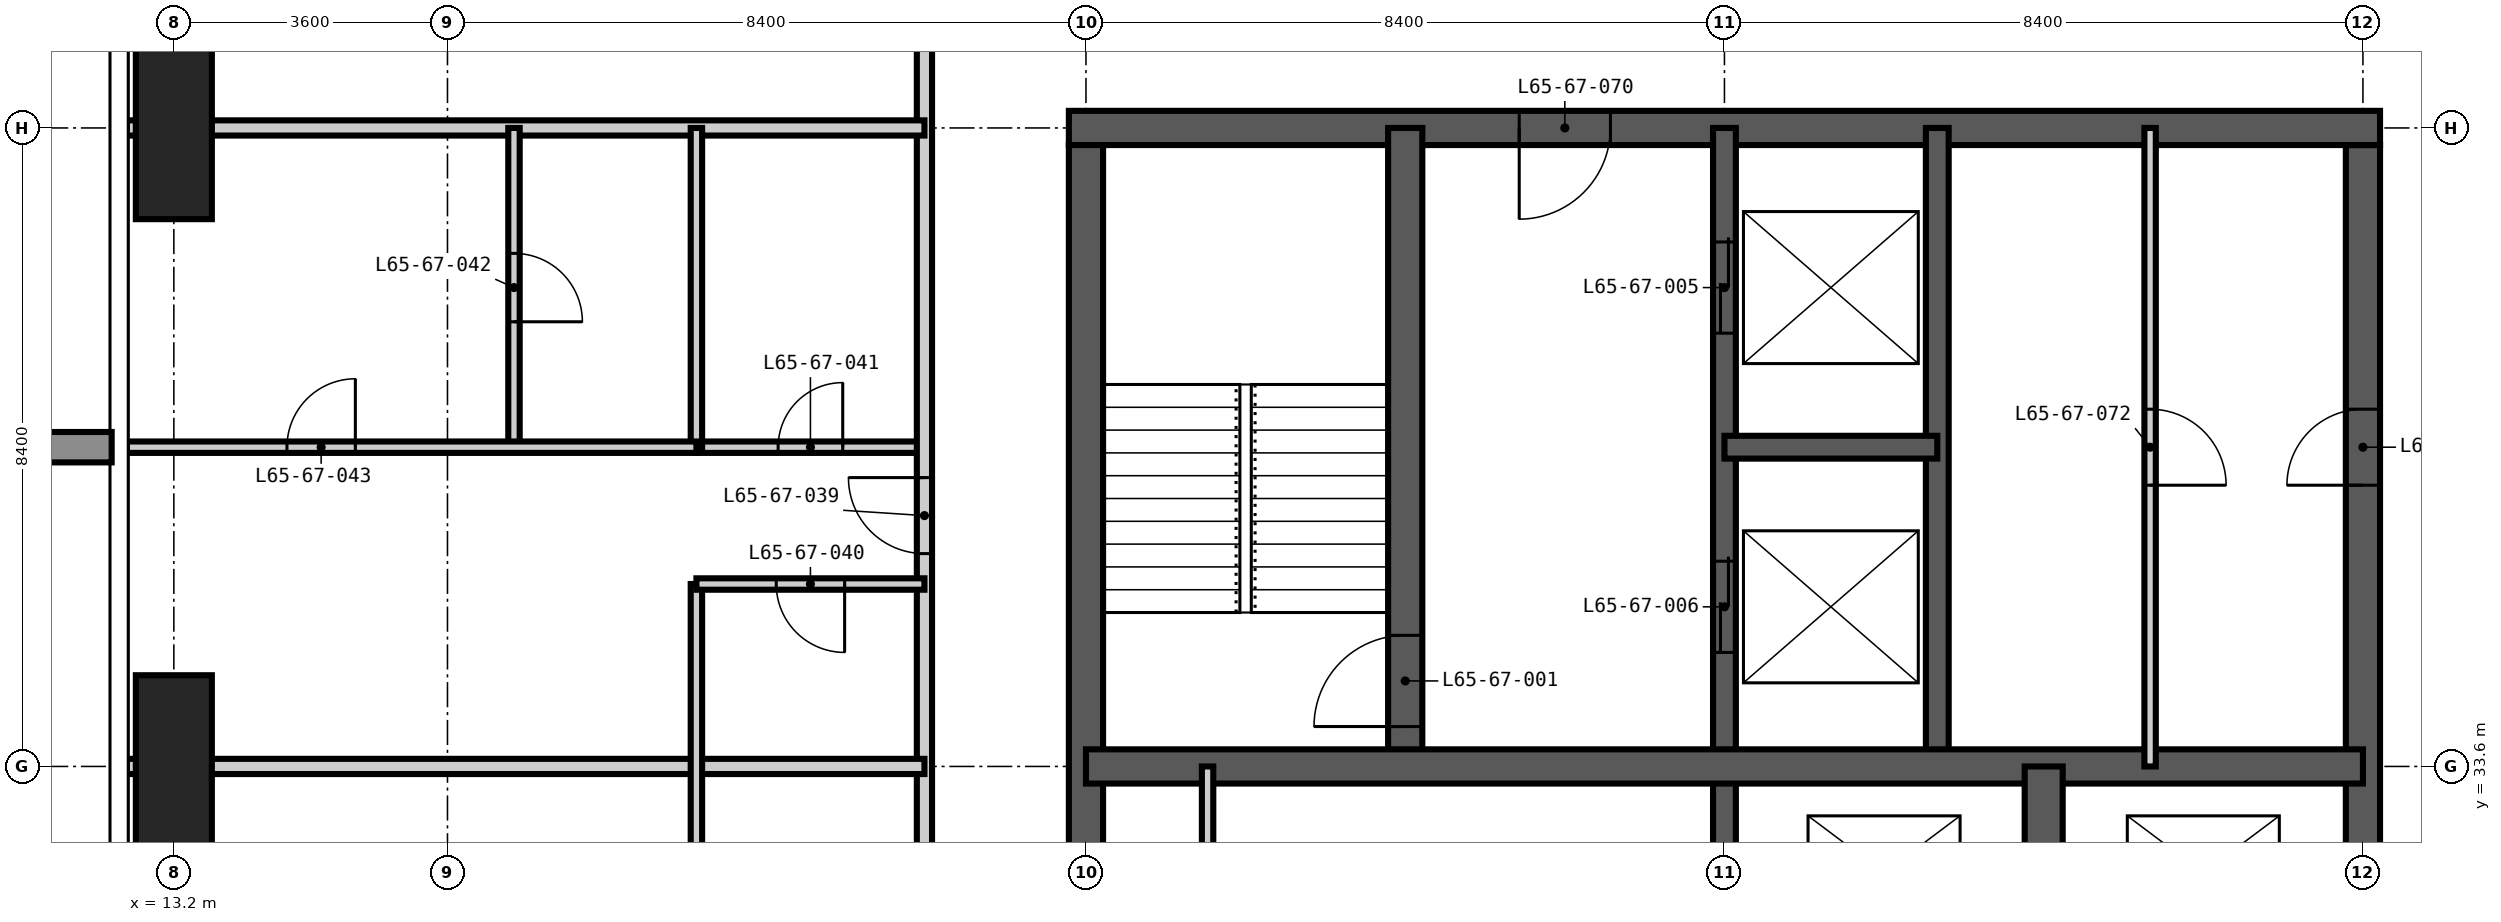
"""IFC4 building model, lengths in metres.
Left out: names, types, materials, properties, quantities, classifications, styles, units other than length and angle.
Written with IfcOpenShell. Run it as: python <this file> out.ifc"""

import sys

from ifc_helpers import new_model, si_unit, direction, frame, frame_2d, origin, origin_2d, place, context, subcontext, project, spatial, rectangle, extrude, element, fill, save


model = new_model("IFC4")
c1 = context("Model", 3, precision=1e-05, world=origin(), true_north=direction((0.0, 1.0)))
c2 = subcontext(c1, "Body", "Model", "MODEL_VIEW")
j1 = project(units=[si_unit("LENGTHUNIT", "METRE"), si_unit("PLANEANGLEUNIT", "RADIAN")], contexts=[c1])
p1 = place(None, origin())
s1 = spatial("IfcSite", under=j1, at=p1, CompositionType="ELEMENT")
p2 = place(p1, origin())
s2 = spatial("IfcBuilding", under=s1, at=p2, CompositionType="ELEMENT")
p3 = place(p2, frame((0.0, 0.0, 252.9)))
s3 = spatial("IfcBuildingStorey", under=s2, at=p3, CompositionType="ELEMENT", Elevation=252.9)
for number, where, z_axis, x_axis in (
    (1, (13.2, 33.6, -0.35), (0.0, 0.0, 1.0), (1.0, 0.0, 0.0)),
    (2, (13.2, 42.0, -0.35), (0.0, 0.0, 1.0), (1.0, 0.0, 0.0)),
):
    element("IfcColumn", number, at=place(p3, frame(where, z_axis=z_axis, x_axis=x_axis)), inside=s3, PredefinedType="COLUMN", context=c2, shape_type="SweptSolid", body=[
        extrude(rectangle(XDim=1.0, YDim=2.4, at=origin_2d()), origin(), (0.0, 0.0, 1.0), 3.9),
    ])
p4 = place(p3, frame((42.0, 17.025, -0.35), z_axis=(0.0, 0.0, 1.0), x_axis=(0.0, 1.0, 0.0)))
e3 = element("IfcWall", 3, at=p4, inside=s3, PredefinedType="SHEAR", context=c2, shape_type="SweptSolid", body=[
    extrude(rectangle(XDim=24.75, YDim=0.45, at=frame_2d((12.375, 0.0))), origin(), (0.0, 0.0, 1.0), 3.9),
])
p5 = place(p4, frame((0.575, 0.0, 0.35)))
e4 = element("IfcOpeningElement", 4, at=p5, cuts=e3, PredefinedType="OPENING", context=c2, shape_type="SweptSolid", body=[
    extrude(rectangle(XDim=1.2, YDim=2.2, at=frame_2d((0.6, 1.1))), frame((0.0, 0.235, 0.0), z_axis=(0.0, -1.0, 0.0), x_axis=(1.0, 0.0, 0.0)), (0.0, 0.0, 1.0), 0.47),
])
p6 = place(p4, frame((11.475, 0.0, 0.35)))
e5 = element("IfcOpeningElement", 5, at=p6, cuts=e3, PredefinedType="OPENING", context=c2, shape_type="SweptSolid", body=[
    extrude(rectangle(XDim=1.8, YDim=2.2, at=frame_2d((0.9, 1.1))), frame((0.0, 0.235, 0.0), z_axis=(0.0, -1.0, 0.0), x_axis=(1.0, 0.0, 0.0)), (0.0, 0.0, 1.0), 0.47),
])
p7 = place(p4, frame((20.275, 0.0, 0.35)))
e6 = element("IfcOpeningElement", 6, at=p7, cuts=e3, PredefinedType="OPENING", context=c2, shape_type="SweptSolid", body=[
    extrude(rectangle(XDim=1.0, YDim=2.1, at=frame_2d((0.5, 1.05))), frame((0.0, 0.235, 0.0), z_axis=(0.0, -1.0, 0.0), x_axis=(1.0, 0.0, 0.0)), (0.0, 0.0, 1.0), 0.47),
])
p8 = place(p3, frame((42.225, 42.0, -0.35), z_axis=(0.0, 0.0, 1.0), x_axis=(-1.0, 0.0, 0.0)))
e7 = element("IfcWall", 7, at=p8, inside=s3, PredefinedType="SHEAR", context=c2, shape_type="SweptSolid", body=[
    extrude(rectangle(XDim=17.25, YDim=0.45, at=frame_2d((8.625, 0.0))), origin(), (0.0, 0.0, 1.0), 3.9),
])
p9 = place(p8, frame((10.125, 0.0, 0.35)))
e8 = element("IfcOpeningElement", 8, at=p9, cuts=e7, PredefinedType="OPENING", context=c2, shape_type="SweptSolid", body=[
    extrude(rectangle(XDim=1.2, YDim=2.2, at=frame_2d((0.6, 1.1))), frame((0.0, 0.235, 0.0), z_axis=(0.0, -1.0, 0.0), x_axis=(1.0, 0.0, 0.0)), (0.0, 0.0, 1.0), 0.47),
])
p10 = place(p3, frame((25.2, 41.775, -0.35), z_axis=(0.0, 0.0, 1.0), x_axis=(0.0, -1.0, 0.0)))
e9 = element("IfcWall", 9, at=p10, inside=s3, PredefinedType="SHEAR", context=c2, shape_type="SweptSolid", body=[
    extrude(rectangle(XDim=24.75, YDim=0.45, at=frame_2d((12.375, 0.0))), origin(), (0.0, 0.0, 1.0), 3.9),
])
p11 = place(p10, frame((11.875, 0.0, 0.35)))
e10 = element("IfcOpeningElement", 10, at=p11, cuts=e9, PredefinedType="OPENING", context=c2, shape_type="SweptSolid", body=[
    extrude(rectangle(XDim=1.0, YDim=2.1, at=frame_2d((0.5, 1.05))), frame((0.0, 0.235, 0.0), z_axis=(0.0, -1.0, 0.0), x_axis=(1.0, 0.0, 0.0)), (0.0, 0.0, 1.0), 0.47),
])
p12 = place(p3, frame((33.6, 16.8, -0.35), z_axis=(0.0, 0.0, 1.0), x_axis=(0.0, 1.0, 0.0)))
e11 = element("IfcWall", 11, at=p12, inside=s3, PredefinedType="SHEAR", context=c2, shape_type="SweptSolid", body=[
    extrude(rectangle(XDim=25.2, YDim=0.3, at=frame_2d((12.6, 0.0))), origin(), (0.0, 0.0, 1.0), 3.9),
])
p13 = place(p12, frame((22.5, 0.0, 0.35)))
e12 = element("IfcOpeningElement", 12, at=p13, cuts=e11, PredefinedType="OPENING", context=c2, shape_type="SweptSolid", body=[
    extrude(rectangle(XDim=1.2, YDim=2.2, at=frame_2d((0.6, 1.1))), frame((0.0, 0.16, 0.0), z_axis=(0.0, -1.0, 0.0), x_axis=(1.0, 0.0, 0.0)), (0.0, 0.0, 1.0), 0.32),
])
p14 = place(p12, frame((18.3, 0.0, 0.35)))
e13 = element("IfcOpeningElement", 13, at=p14, cuts=e11, PredefinedType="OPENING", context=c2, shape_type="SweptSolid", body=[
    extrude(rectangle(XDim=1.2, YDim=2.2, at=frame_2d((0.6, 1.1))), frame((0.0, 0.16, 0.0), z_axis=(0.0, -1.0, 0.0), x_axis=(1.0, 0.0, 0.0)), (0.0, 0.0, 1.0), 0.32),
])
p15 = place(p12, frame((9.3, 0.0, 0.35)))
e14 = element("IfcOpeningElement", 14, at=p15, cuts=e11, PredefinedType="OPENING", context=c2, shape_type="SweptSolid", body=[
    extrude(rectangle(XDim=1.0, YDim=2.1, at=frame_2d((0.5, 1.05))), frame((0.0, 0.16, 0.0), z_axis=(0.0, -1.0, 0.0), x_axis=(1.0, 0.0, 0.0)), (0.0, 0.0, 1.0), 0.32),
])
p16 = place(p3, frame((36.4, 33.6, -0.35), z_axis=(0.0, 0.0, 1.0), x_axis=(0.0, 1.0, 0.0)))
e15 = element("IfcWall", 15, at=p16, inside=s3, PredefinedType="SHEAR", context=c2, shape_type="SweptSolid", body=[
    extrude(rectangle(XDim=8.4, YDim=0.3, at=frame_2d((4.2, 0.0))), origin(), (0.0, 0.0, 1.0), 3.9),
])
p17 = place(p3, frame((33.6, 37.8, -0.35), z_axis=(0.0, 0.0, 1.0), x_axis=(1.0, 0.0, 0.0)))
e16 = element("IfcWall", 16, at=p17, inside=s3, PredefinedType="SHEAR", context=c2, shape_type="SweptSolid", body=[
    extrude(rectangle(XDim=2.8, YDim=0.3, at=frame_2d((1.4, 0.0))), origin(), (0.0, 0.0, 1.0), 3.9),
])
p18 = place(p3, frame((29.4, 33.6, -0.35), z_axis=(0.0, 0.0, 1.0), x_axis=(0.0, 1.0, 0.0)))
e17 = element("IfcWall", 17, at=p18, inside=s3, PredefinedType="SHEAR", context=c2, shape_type="SweptSolid", body=[
    extrude(rectangle(XDim=8.4, YDim=0.45, at=frame_2d((4.2, 0.0))), origin(), (0.0, 0.0, 1.0), 3.9),
])
p19 = place(p18, frame((0.525, 0.0, 0.35)))
e18 = element("IfcOpeningElement", 18, at=p19, cuts=e17, PredefinedType="OPENING", context=c2, shape_type="SweptSolid", body=[
    extrude(rectangle(XDim=1.2, YDim=2.2, at=frame_2d((0.6, 1.1))), frame((0.0, 0.235, 0.0), z_axis=(0.0, -1.0, 0.0), x_axis=(1.0, 0.0, 0.0)), (0.0, 0.0, 1.0), 0.47),
])
p20 = place(p3, frame((25.2, 33.6, -0.35), z_axis=(0.0, 0.0, 1.0), x_axis=(1.0, 0.0, 0.0)))
e19 = element("IfcWall", 19, at=p20, inside=s3, PredefinedType="SHEAR", context=c2, shape_type="SweptSolid", body=[
    extrude(rectangle(XDim=16.8, YDim=0.45, at=frame_2d((8.4, 0.0))), origin(), (0.0, 0.0, 1.0), 3.9),
])
p21 = place(p3, frame((37.8, 30.8, -0.35), z_axis=(0.0, 0.0, 1.0), x_axis=(0.0, 1.0, 0.0)))
e20 = element("IfcWall", 20, at=p21, inside=s3, PredefinedType="SHEAR", context=c2, shape_type="SweptSolid", body=[
    extrude(rectangle(XDim=2.8, YDim=0.5, at=frame_2d((1.4, 0.0))), origin(), (0.0, 0.0, 1.0), 3.9),
])
p22 = place(p3, frame((20.075, 37.8, 0.0), z_axis=(0.0, 0.0, 1.0), x_axis=(1.0, 0.0, 0.0)))
e21 = element("IfcWall", 21, at=p22, inside=s3, PredefinedType="PARTITIONING", context=c2, shape_type="SweptSolid", body=[
    extrude(rectangle(XDim=3.0, YDim=0.15, at=frame_2d((1.5, 0.0))), origin(), (0.0, 0.0, 1.0), 3.55),
])
p23 = place(p22, frame((1.075, 0.0, 0.0)))
e22 = element("IfcOpeningElement", 22, at=p23, cuts=e21, PredefinedType="OPENING", context=c2, shape_type="SweptSolid", body=[
    extrude(rectangle(XDim=0.85, YDim=2.1, at=frame_2d((0.425, 1.05))), frame((0.0, 0.085, 0.0), z_axis=(0.0, -1.0, 0.0), x_axis=(1.0, 0.0, 0.0)), (0.0, 0.0, 1.0), 0.17),
])
p24 = place(p3, frame((23.075, 14.675, 0.0), z_axis=(0.0, 0.0, 1.0), x_axis=(0.0, 1.0, 0.0)))
e23 = element("IfcWall", 23, at=p24, inside=s3, PredefinedType="PARTITIONING", context=c2, shape_type="SweptSolid", body=[
    extrude(rectangle(XDim=30.65, YDim=0.2, at=frame_2d((15.325, 0.0))), origin(), (0.0, 0.0, 1.0), 3.55),
])
p25 = place(p24, frame((4.925, 0.0, 0.0)))
e24 = element("IfcOpeningElement", 24, at=p25, cuts=e23, PredefinedType="OPENING", context=c2, shape_type="SweptSolid", body=[
    extrude(rectangle(XDim=1.0, YDim=2.2, at=frame_2d((0.5, 1.1))), frame((0.0, 0.11, 0.0), z_axis=(0.0, -1.0, 0.0), x_axis=(1.0, 0.0, 0.0)), (0.0, 0.0, 1.0), 0.22),
])
p26 = place(p24, frame((15.125, 0.0, 0.0)))
e25 = element("IfcOpeningElement", 25, at=p26, cuts=e23, PredefinedType="OPENING", context=c2, shape_type="SweptSolid", body=[
    extrude(rectangle(XDim=1.0, YDim=2.2, at=frame_2d((0.5, 1.1))), frame((0.0, 0.11, 0.0), z_axis=(0.0, -1.0, 0.0), x_axis=(1.0, 0.0, 0.0)), (0.0, 0.0, 1.0), 0.22),
])
p27 = place(p24, frame((21.725, 0.0, 0.0)))
e26 = element("IfcOpeningElement", 26, at=p27, cuts=e23, PredefinedType="OPENING", context=c2, shape_type="SweptSolid", body=[
    extrude(rectangle(XDim=1.0, YDim=2.2, at=frame_2d((0.5, 1.1))), frame((0.0, 0.11, 0.0), z_axis=(0.0, -1.0, 0.0), x_axis=(1.0, 0.0, 0.0)), (0.0, 0.0, 1.0), 0.22),
])
p28 = place(p24, frame((0.563, 0.0, 0.0)))
e27 = element("IfcOpeningElement", 27, at=p28, cuts=e23, PredefinedType="OPENING", context=c2, shape_type="SweptSolid", body=[
    extrude(rectangle(XDim=1.0, YDim=2.2, at=frame_2d((0.5, 1.1))), frame((0.0, 0.11, 0.0), z_axis=(0.0, -1.0, 0.0), x_axis=(1.0, 0.0, 0.0)), (0.0, 0.0, 1.0), 0.22),
])
p29 = place(p24, frame((28.488, 0.0, 0.0)))
e28 = element("IfcOpeningElement", 28, at=p29, cuts=e23, PredefinedType="OPENING", context=c2, shape_type="SweptSolid", body=[
    extrude(rectangle(XDim=1.0, YDim=2.2, at=frame_2d((0.5, 1.1))), frame((0.0, 0.11, 0.0), z_axis=(0.0, -1.0, 0.0), x_axis=(1.0, 0.0, 0.0)), (0.0, 0.0, 1.0), 0.22),
])
for number, where, z_axis, x_axis in (
    (29, (12.582, 33.6, 0.0), (0.0, 0.0, 1.0), (1.0, 0.0, 0.0)),
    (30, (12.582, 42.0, 0.0), (0.0, 0.0, 1.0), (1.0, 0.0, 0.0)),
):
    element("IfcWall", number, at=place(p3, frame(where, z_axis=z_axis, x_axis=x_axis)), inside=s3, PredefinedType="PARTITIONING", context=c2, shape_type="SweptSolid", body=[
        extrude(rectangle(XDim=10.493, YDim=0.2, at=frame_2d((5.247, 0.0))), origin(), (0.0, 0.0, 1.0), 3.55),
    ])
p30 = place(p3, frame((17.675, 37.8, 0.0), z_axis=(0.0, 0.0, 1.0), x_axis=(0.0, 1.0, 0.0)))
e31 = element("IfcWall", 31, at=p30, inside=s3, PredefinedType="PARTITIONING", context=c2, shape_type="SweptSolid", body=[
    extrude(rectangle(XDim=4.2, YDim=0.15, at=frame_2d((2.1, 0.0))), origin(), (0.0, 0.0, 1.0), 3.55),
])
p31 = place(p30, frame((1.65, 0.0, 0.0)))
e32 = element("IfcOpeningElement", 32, at=p31, cuts=e31, PredefinedType="OPENING", context=c2, shape_type="SweptSolid", body=[
    extrude(rectangle(XDim=0.9, YDim=2.1, at=frame_2d((0.45, 1.05))), frame((0.0, 0.085, 0.0), z_axis=(0.0, -1.0, 0.0), x_axis=(1.0, 0.0, 0.0)), (0.0, 0.0, 1.0), 0.17),
])
p32 = place(p3, frame((20.075, 31.2, 0.0), z_axis=(0.0, 0.0, 1.0), x_axis=(0.0, 1.0, 0.0)))
e33 = element("IfcWall", 33, at=p32, inside=s3, PredefinedType="PARTITIONING", context=c2, shape_type="SweptSolid", body=[
    extrude(rectangle(XDim=4.8, YDim=0.15, at=frame_2d((2.4, 0.0))), origin(), (0.0, 0.0, 1.0), 3.55),
])
p33 = place(p3, frame((20.075, 37.8, 0.0), z_axis=(0.0, 0.0, 1.0), x_axis=(0.0, 1.0, 0.0)))
e34 = element("IfcWall", 34, at=p33, inside=s3, PredefinedType="PARTITIONING", context=c2, shape_type="SweptSolid", body=[
    extrude(rectangle(XDim=4.2, YDim=0.15, at=frame_2d((2.1, 0.0))), origin(), (0.0, 0.0, 1.0), 3.55),
])
p34 = place(p3, frame((26.8, 25.2, 0.0), z_axis=(0.0, 0.0, 1.0), x_axis=(0.0, 1.0, 0.0)))
e35 = element("IfcWall", 35, at=p34, inside=s3, PredefinedType="PARTITIONING", context=c2, shape_type="SweptSolid", body=[
    extrude(rectangle(XDim=8.4, YDim=0.15, at=frame_2d((4.2, 0.0))), origin(), (0.0, 0.0, 1.0), 3.55),
])
p35 = place(p34, frame((0.9, 0.0, 0.0)))
e36 = element("IfcOpeningElement", 36, at=p35, cuts=e35, PredefinedType="OPENING", context=c2, shape_type="SweptSolid", body=[
    extrude(rectangle(XDim=1.0, YDim=2.1, at=frame_2d((0.5, 1.05))), frame((0.0, 0.085, 0.0), z_axis=(0.0, -1.0, 0.0), x_axis=(1.0, 0.0, 0.0)), (0.0, 0.0, 1.0), 0.17),
])
p36 = place(p34, frame((5.1, 0.0, 0.0)))
e37 = element("IfcOpeningElement", 37, at=p36, cuts=e35, PredefinedType="OPENING", context=c2, shape_type="SweptSolid", body=[
    extrude(rectangle(XDim=1.0, YDim=2.1, at=frame_2d((0.5, 1.05))), frame((0.0, 0.085, 0.0), z_axis=(0.0, -1.0, 0.0), x_axis=(1.0, 0.0, 0.0)), (0.0, 0.0, 1.0), 0.17),
])
p37 = place(p3, frame((39.2, 33.6, 0.0), z_axis=(0.0, 0.0, 1.0), x_axis=(0.0, 1.0, 0.0)))
e38 = element("IfcWall", 38, at=p37, inside=s3, PredefinedType="PARTITIONING", context=c2, shape_type="SweptSolid", body=[
    extrude(rectangle(XDim=8.4, YDim=0.15, at=frame_2d((4.2, 0.0))), origin(), (0.0, 0.0, 1.0), 3.55),
])
p38 = place(p37, frame((3.7, 0.0, 0.0)))
e39 = element("IfcOpeningElement", 39, at=p38, cuts=e38, PredefinedType="OPENING", context=c2, shape_type="SweptSolid", body=[
    extrude(rectangle(XDim=1.0, YDim=2.1, at=frame_2d((0.5, 1.05))), frame((0.0, 0.085, 0.0), z_axis=(0.0, -1.0, 0.0), x_axis=(1.0, 0.0, 0.0)), (0.0, 0.0, 1.0), 0.17),
])
p39 = place(p3, frame((20.075, 36.0, 0.0), z_axis=(0.0, 0.0, 1.0), x_axis=(1.0, 0.0, 0.0)))
e40 = element("IfcWall", 40, at=p39, inside=s3, PredefinedType="PARTITIONING", context=c2, shape_type="SweptSolid", body=[
    extrude(rectangle(XDim=3.0, YDim=0.15, at=frame_2d((1.5, 0.0))), origin(), (0.0, 0.0, 1.0), 3.55),
])
p40 = place(p39, frame((1.05, 0.0, 0.0)))
e41 = element("IfcOpeningElement", 41, at=p40, cuts=e40, PredefinedType="OPENING", context=c2, shape_type="SweptSolid", body=[
    extrude(rectangle(XDim=0.9, YDim=2.1, at=frame_2d((0.45, 1.05))), frame((0.0, 0.085, 0.0), z_axis=(0.0, -1.0, 0.0), x_axis=(1.0, 0.0, 0.0)), (0.0, 0.0, 1.0), 0.17),
])
p41 = place(p3, frame((12.582, 37.8, 0.0), z_axis=(0.0, 0.0, 1.0), x_axis=(1.0, 0.0, 0.0)))
e42 = element("IfcWall", 42, at=p41, inside=s3, PredefinedType="PARTITIONING", context=c2, shape_type="SweptSolid", body=[
    extrude(rectangle(XDim=7.493, YDim=0.15, at=frame_2d((3.747, 0.0))), origin(), (0.0, 0.0, 1.0), 3.55),
])
p42 = place(p41, frame((2.106, 0.0, 0.0)))
e43 = element("IfcOpeningElement", 43, at=p42, cuts=e42, PredefinedType="OPENING", context=c2, shape_type="SweptSolid", body=[
    extrude(rectangle(XDim=0.9, YDim=2.1, at=frame_2d((0.45, 1.05))), frame((0.0, 0.085, 0.0), z_axis=(0.0, -1.0, 0.0), x_axis=(1.0, 0.0, 0.0)), (0.0, 0.0, 1.0), 0.17),
])
p43 = place(p19, origin())
e44 = element("IfcDoor", 44, at=p43, inside=s3, OperationType="SINGLE_SWING_LEFT", PredefinedType="DOOR", context=c2, shape_type="SweptSolid", body=[
    extrude(rectangle(XDim=1.2, YDim=2.2, at=frame_2d((0.6, 1.1))), frame((0.0, 0.025, 0.0), z_axis=(0.0, -1.0, 0.0), x_axis=(1.0, 0.0, 0.0)), (0.0, 0.0, 1.0), 0.05),
])
fill(e18, e44)
p44 = place(p13, origin())
e45 = element("IfcDoor", 45, at=p44, inside=s3, OperationType="DOUBLE_DOOR_SLIDING", PredefinedType="DOOR", context=c2, shape_type="SweptSolid", body=[
    extrude(rectangle(XDim=1.2, YDim=2.2, at=frame_2d((0.6, 1.1))), frame((0.0, 0.025, 0.0), z_axis=(0.0, -1.0, 0.0), x_axis=(1.0, 0.0, 0.0)), (0.0, 0.0, 1.0), 0.05),
])
fill(e12, e45)
p45 = place(p14, origin())
e46 = element("IfcDoor", 46, at=p45, inside=s3, OperationType="DOUBLE_DOOR_SLIDING", PredefinedType="DOOR", context=c2, shape_type="SweptSolid", body=[
    extrude(rectangle(XDim=1.2, YDim=2.2, at=frame_2d((0.6, 1.1))), frame((0.0, 0.025, 0.0), z_axis=(0.0, -1.0, 0.0), x_axis=(1.0, 0.0, 0.0)), (0.0, 0.0, 1.0), 0.05),
])
fill(e13, e46)
p46 = place(p27, origin())
e47 = element("IfcDoor", 47, at=p46, inside=s3, OperationType="SINGLE_SWING_RIGHT", PredefinedType="DOOR", context=c2, shape_type="SweptSolid", body=[
    extrude(rectangle(XDim=1.0, YDim=2.2, at=frame_2d((0.5, 1.1))), frame((0.0, 0.025, 0.0), z_axis=(0.0, -1.0, 0.0), x_axis=(1.0, 0.0, 0.0)), (0.0, 0.0, 1.0), 0.05),
])
fill(e26, e47)
p47 = place(p40, frame((0.9, 0.0, 0.0), z_axis=(0.0, 0.0, 1.0), x_axis=(-1.0, 0.0, 0.0)))
e48 = element("IfcDoor", 48, at=p47, inside=s3, OperationType="SINGLE_SWING_LEFT", PredefinedType="DOOR", context=c2, shape_type="SweptSolid", body=[
    extrude(rectangle(XDim=0.9, YDim=2.1, at=frame_2d((0.45, 1.05))), frame((0.0, 0.025, 0.0), z_axis=(0.0, -1.0, 0.0), x_axis=(1.0, 0.0, 0.0)), (0.0, 0.0, 1.0), 0.05),
])
fill(e41, e48)
p48 = place(p23, origin())
e49 = element("IfcDoor", 49, at=p48, inside=s3, OperationType="SINGLE_SWING_RIGHT", PredefinedType="DOOR", context=c2, shape_type="SweptSolid", body=[
    extrude(rectangle(XDim=0.85, YDim=2.1, at=frame_2d((0.425, 1.05))), frame((0.0, 0.025, 0.0), z_axis=(0.0, -1.0, 0.0), x_axis=(1.0, 0.0, 0.0)), (0.0, 0.0, 1.0), 0.05),
])
fill(e22, e49)
p49 = place(p31, frame((0.9, 0.0, 0.0), z_axis=(0.0, 0.0, 1.0), x_axis=(-1.0, 0.0, 0.0)))
e50 = element("IfcDoor", 50, at=p49, inside=s3, OperationType="SINGLE_SWING_RIGHT", PredefinedType="DOOR", context=c2, shape_type="SweptSolid", body=[
    extrude(rectangle(XDim=0.9, YDim=2.1, at=frame_2d((0.45, 1.05))), frame((0.0, 0.025, 0.0), z_axis=(0.0, -1.0, 0.0), x_axis=(1.0, 0.0, 0.0)), (0.0, 0.0, 1.0), 0.05),
])
fill(e32, e50)
p50 = place(p42, origin())
e51 = element("IfcDoor", 51, at=p50, inside=s3, OperationType="SINGLE_SWING_RIGHT", PredefinedType="DOOR", context=c2, shape_type="SweptSolid", body=[
    extrude(rectangle(XDim=0.9, YDim=2.1, at=frame_2d((0.45, 1.05))), frame((0.0, 0.025, 0.0), z_axis=(0.0, -1.0, 0.0), x_axis=(1.0, 0.0, 0.0)), (0.0, 0.0, 1.0), 0.05),
])
fill(e43, e51)
p51 = place(p9, origin())
e52 = element("IfcDoor", 52, at=p51, inside=s3, OperationType="SINGLE_SWING_RIGHT", PredefinedType="DOOR", context=c2, shape_type="SweptSolid", body=[
    extrude(rectangle(XDim=1.2, YDim=2.2, at=frame_2d((0.6, 1.1))), frame((0.0, 0.025, 0.0), z_axis=(0.0, -1.0, 0.0), x_axis=(1.0, 0.0, 0.0)), (0.0, 0.0, 1.0), 0.05),
])
fill(e8, e52)
p52 = place(p7, origin())
e53 = element("IfcDoor", 53, at=p52, inside=s3, OperationType="SINGLE_SWING_LEFT", PredefinedType="DOOR", context=c2, shape_type="SweptSolid", body=[
    extrude(rectangle(XDim=1.0, YDim=2.1, at=frame_2d((0.5, 1.05))), frame((0.0, 0.025, 0.0), z_axis=(0.0, -1.0, 0.0), x_axis=(1.0, 0.0, 0.0)), (0.0, 0.0, 1.0), 0.05),
])
fill(e6, e53)
p53 = place(p38, frame((1.0, 0.0, 0.0), z_axis=(0.0, 0.0, 1.0), x_axis=(-1.0, 0.0, 0.0)))
e54 = element("IfcDoor", 54, at=p53, inside=s3, OperationType="SINGLE_SWING_RIGHT", PredefinedType="DOOR", context=c2, shape_type="SweptSolid", body=[
    extrude(rectangle(XDim=1.0, YDim=2.1, at=frame_2d((0.5, 1.05))), frame((0.0, 0.025, 0.0), z_axis=(0.0, -1.0, 0.0), x_axis=(1.0, 0.0, 0.0)), (0.0, 0.0, 1.0), 0.05),
])
fill(e39, e54)
save(model, sys.argv[1])
